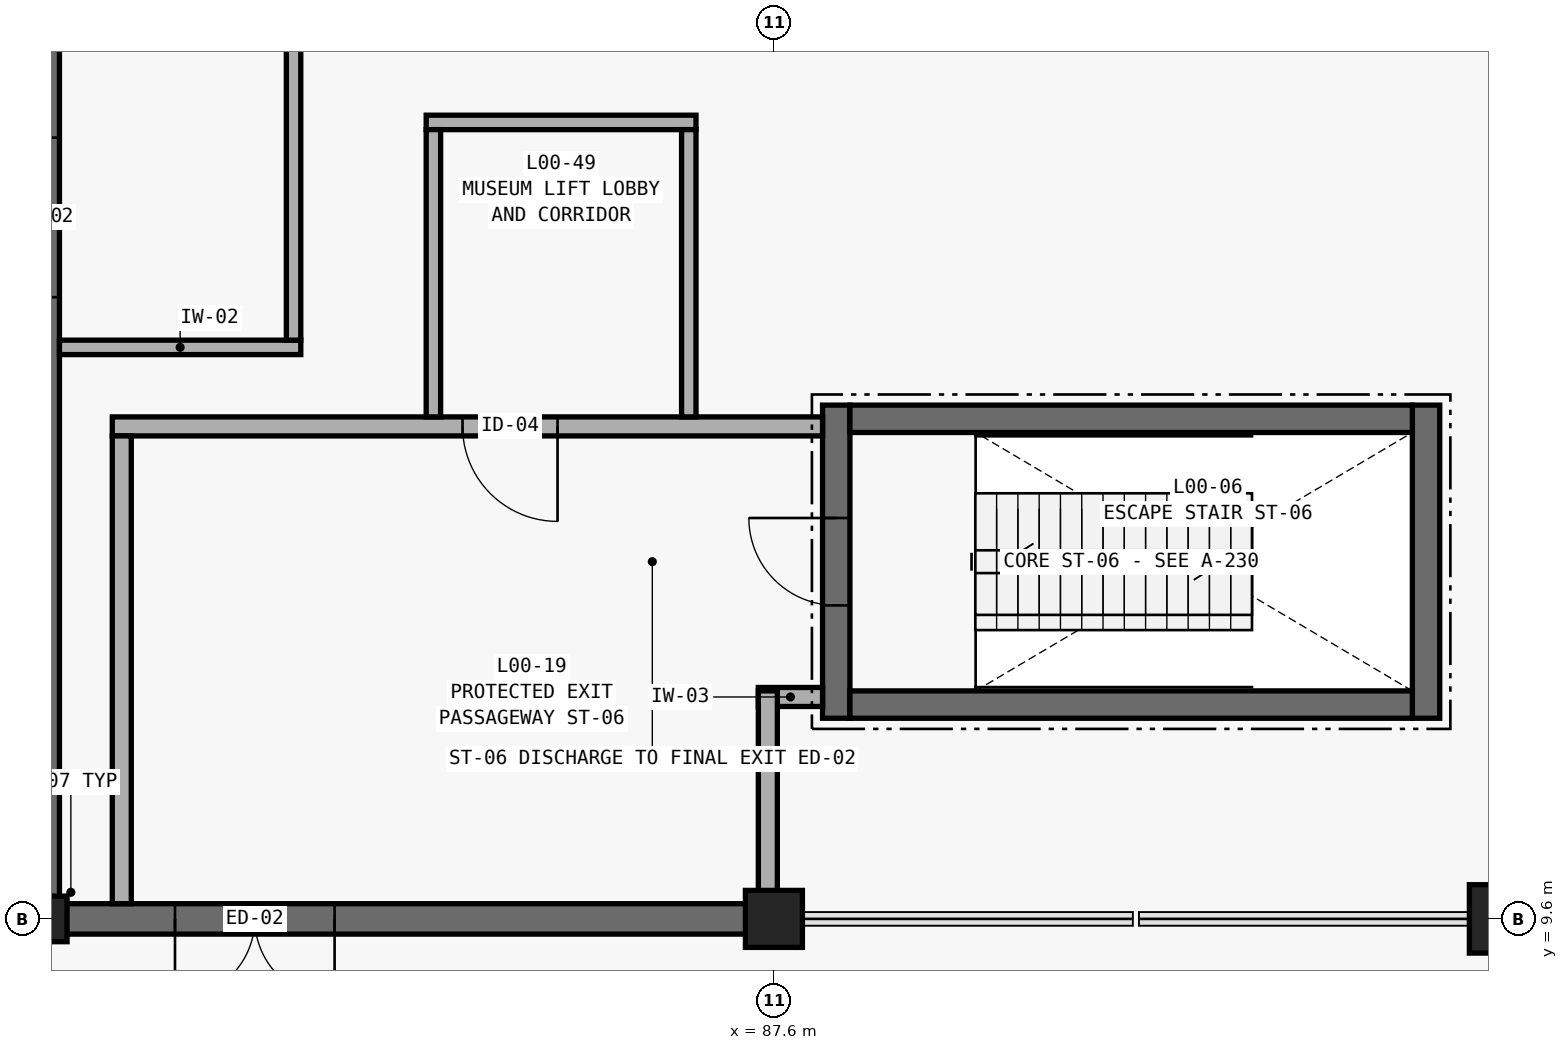
"""IFC4 building model, lengths in metres.
Left out: names, types, materials, properties, quantities, classifications, styles, units other than length and angle.
Written with IfcOpenShell. Run it as: python <this file> out.ifc"""

import sys

from ifc_helpers import new_model, si_unit, direction, frame, frame_2d, origin, origin_2d, place, context, subcontext, project, spatial, rectangle, extrude, element, fill, save


model = new_model("IFC4")
c1 = context("Model", 3, precision=1e-05, world=origin(), true_north=direction((0.0, 1.0)))
c2 = subcontext(c1, "Body", "Model", "MODEL_VIEW")
j1 = project(units=[si_unit("LENGTHUNIT", "METRE"), si_unit("PLANEANGLEUNIT", "RADIAN")], contexts=[c1])
p1 = place(None, origin())
s1 = spatial("IfcSite", under=j1, at=p1, CompositionType="ELEMENT")
p2 = place(p1, origin())
s2 = spatial("IfcBuilding", under=s1, at=p2, CompositionType="ELEMENT")
p3 = place(p2, origin())
s3 = spatial("IfcBuildingStorey", under=s2, at=p3, CompositionType="ELEMENT", Elevation=0.0)
p4 = place(p3, frame((78.0, 9.6, 0.0), z_axis=(0.0, 0.0, 1.0), x_axis=(1.0, 0.0, 0.0)))
e1 = element("IfcColumn", 1, at=p4, inside=s3, PredefinedType="COLUMN", context=c2, shape_type="SweptSolid", body=[
    extrude(rectangle(XDim=0.6, YDim=0.6, at=origin_2d()), origin(), (0.0, 0.0, 1.0), 4.8),
])
p5 = place(p3, frame((87.6, 9.6, 0.0), z_axis=(0.0, 0.0, 1.0), x_axis=(1.0, 0.0, 0.0)))
e2 = element("IfcColumn", 2, at=p5, inside=s3, PredefinedType="COLUMN", context=c2, shape_type="SweptSolid", body=[
    extrude(rectangle(XDim=0.75, YDim=0.75, at=origin_2d()), origin(), (0.0, 0.0, 1.0), 4.8),
])
p6 = place(p3, frame((97.2, 9.6, 0.0), z_axis=(0.0, 0.0, 1.0), x_axis=(1.0, 0.0, 0.0)))
e3 = element("IfcColumn", 3, at=p6, inside=s3, PredefinedType="COLUMN", context=c2, shape_type="SweptSolid", body=[
    extrude(rectangle(XDim=0.9, YDim=0.9, at=origin_2d()), origin(), (0.0, 0.0, 1.0), 4.8),
])
p7 = place(p3, frame((78.0, 21.78, 0.0), z_axis=(0.0, 0.0, 1.0), x_axis=(0.0, -1.0, 0.0)))
e4 = element("IfcWall", 4, at=p7, inside=s3, PredefinedType="STANDARD", context=c2, shape_type="SweptSolid", body=[
    extrude(rectangle(XDim=12.36, YDim=0.4, at=frame_2d((6.18, 0.0))), origin(), (0.0, 0.0, 1.0), 4.5),
])
p8 = place(p7, frame((1.9, 0.0, 0.0)))
e5 = element("IfcOpeningElement", 5, at=p8, cuts=e4, PredefinedType="OPENING", context=c2, shape_type="SweptSolid", body=[
    extrude(rectangle(XDim=2.1, YDim=2.6, at=frame_2d((1.05, 1.3))), frame((0.0, 0.215, 0.0), z_axis=(0.0, -1.0, 0.0), x_axis=(1.0, 0.0, 0.0)), (0.0, 0.0, 1.0), 0.43),
])
p9 = place(p3, frame((77.82, 9.6, 0.0), z_axis=(0.0, 0.0, 1.0), x_axis=(1.0, 0.0, 0.0)))
e6 = element("IfcWall", 6, at=p9, inside=s3, PredefinedType="STANDARD", context=c2, shape_type="SweptSolid", body=[
    extrude(rectangle(XDim=9.96, YDim=0.4, at=frame_2d((4.98, 0.0))), origin(), (0.0, 0.0, 1.0), 4.5),
])
p10 = place(p9, frame((1.9, 0.0, 0.0)))
e7 = element("IfcOpeningElement", 7, at=p10, cuts=e6, PredefinedType="OPENING", context=c2, shape_type="SweptSolid", body=[
    extrude(rectangle(XDim=2.1, YDim=2.6, at=frame_2d((1.05, 1.3))), frame((0.0, 0.215, 0.0), z_axis=(0.0, -1.0, 0.0), x_axis=(1.0, 0.0, 0.0)), (0.0, 0.0, 1.0), 0.43),
])
p11 = place(p3, frame((88.42, 12.24, 0.0), z_axis=(0.0, 0.0, 1.0), x_axis=(0.0, 1.0, 0.0)))
e8 = element("IfcWall", 8, at=p11, inside=s3, PredefinedType="SHEAR", context=c2, shape_type="SweptSolid", body=[
    extrude(rectangle(XDim=4.12, YDim=0.36, at=frame_2d((2.06, 0.0))), origin(), (0.0, 0.0, 1.0), 4.5),
])
p12 = place(p11, frame((1.485, 0.0, 0.0)))
e9 = element("IfcOpeningElement", 9, at=p12, cuts=e8, PredefinedType="OPENING", context=c2, shape_type="SweptSolid", body=[
    extrude(rectangle(XDim=1.15, YDim=2.15, at=frame_2d((0.575, 1.075))), frame((0.0, 0.195, 0.0), z_axis=(0.0, -1.0, 0.0), x_axis=(1.0, 0.0, 0.0)), (0.0, 0.0, 1.0), 0.39),
])
p13 = place(p3, frame((96.18, 12.24, 0.0), z_axis=(0.0, 0.0, 1.0), x_axis=(0.0, 1.0, 0.0)))
e10 = element("IfcWall", 10, at=p13, inside=s3, PredefinedType="SHEAR", context=c2, shape_type="SweptSolid", body=[
    extrude(rectangle(XDim=4.12, YDim=0.36, at=frame_2d((2.06, 0.0))), origin(), (0.0, 0.0, 1.0), 4.5),
])
for number, where, z_axis, x_axis in (
    (11, (88.6, 16.18, 0.0), (0.0, 0.0, 1.0), (1.0, 0.0, 0.0)),
    (12, (88.6, 12.42, 0.0), (0.0, 0.0, 1.0), (1.0, 0.0, 0.0)),
):
    element("IfcWall", number, at=place(p3, frame(where, z_axis=z_axis, x_axis=x_axis)), inside=s3, PredefinedType="SHEAR", context=c2, shape_type="SweptSolid", body=[
        extrude(rectangle(XDim=7.4, YDim=0.36, at=frame_2d((3.7, 0.0))), origin(), (0.0, 0.0, 1.0), 4.5),
    ])
p14 = place(p3, frame((87.395, 12.52, 0.0), z_axis=(0.0, 0.0, 1.0), x_axis=(1.0, 0.0, 0.0)))
e13 = element("IfcWall", 13, at=p14, inside=s3, PredefinedType="PARTITIONING", context=c2, shape_type="SweptSolid", body=[
    extrude(rectangle(XDim=0.845, YDim=0.25, at=frame_2d((0.422, 0.0))), origin(), (0.0, 0.0, 1.0), 3.38),
])
p15 = place(p3, frame((78.895, 16.08, 0.0), z_axis=(0.0, 0.0, 1.0), x_axis=(1.0, 0.0, 0.0)))
e14 = element("IfcWall", 14, at=p15, inside=s3, PredefinedType="PARTITIONING", context=c2, shape_type="SweptSolid", body=[
    extrude(rectangle(XDim=9.345, YDim=0.25, at=frame_2d((4.672, 0.0))), origin(), (0.0, 0.0, 1.0), 3.38),
])
p16 = place(p15, frame((4.608, 0.0, 0.0)))
e15 = element("IfcOpeningElement", 15, at=p16, cuts=e14, PredefinedType="OPENING", context=c2, shape_type="SweptSolid", body=[
    extrude(rectangle(XDim=1.25, YDim=2.15, at=frame_2d((0.625, 1.075))), frame((0.0, 0.14, 0.0), z_axis=(0.0, -1.0, 0.0), x_axis=(1.0, 0.0, 0.0)), (0.0, 0.0, 1.0), 0.28),
])
p17 = place(p3, frame((78.2, 17.12, 0.0), z_axis=(0.0, 0.0, 1.0), x_axis=(1.0, 0.0, 0.0)))
e16 = element("IfcWall", 16, at=p17, inside=s3, PredefinedType="PARTITIONING", context=c2, shape_type="SweptSolid", body=[
    extrude(rectangle(XDim=3.175, YDim=0.19, at=frame_2d((1.587, 0.0))), origin(), (0.0, 0.0, 1.0), 3.38),
])
p18 = place(p3, frame((83.025, 20.08, 0.0), z_axis=(0.0, 0.0, 1.0), x_axis=(1.0, 0.0, 0.0)))
e17 = element("IfcWall", 17, at=p18, inside=s3, PredefinedType="PARTITIONING", context=c2, shape_type="SweptSolid", body=[
    extrude(rectangle(XDim=3.55, YDim=0.19, at=frame_2d((1.775, 0.0))), origin(), (0.0, 0.0, 1.0), 3.38),
])
p19 = place(p3, frame((79.02, 9.8, 0.0), z_axis=(0.0, 0.0, 1.0), x_axis=(0.0, 1.0, 0.0)))
e18 = element("IfcWall", 18, at=p19, inside=s3, PredefinedType="PARTITIONING", context=c2, shape_type="SweptSolid", body=[
    extrude(rectangle(XDim=6.155, YDim=0.25, at=frame_2d((3.078, 0.0))), origin(), (0.0, 0.0, 1.0), 3.38),
])
p20 = place(p3, frame((81.28, 17.215, 0.0), z_axis=(0.0, 0.0, 1.0), x_axis=(0.0, 1.0, 0.0)))
e19 = element("IfcWall", 19, at=p20, inside=s3, PredefinedType="PARTITIONING", context=c2, shape_type="SweptSolid", body=[
    extrude(rectangle(XDim=15.37, YDim=0.19, at=frame_2d((7.685, 0.0))), origin(), (0.0, 0.0, 1.0), 3.38),
])
for number, where, z_axis, x_axis in (
    (20, (83.12, 16.205, 0.0), (0.0, 0.0, 1.0), (0.0, 1.0, 0.0)),
    (21, (86.48, 16.205, 0.0), (0.0, 0.0, 1.0), (0.0, 1.0, 0.0)),
):
    element("IfcWall", number, at=place(p3, frame(where, z_axis=z_axis, x_axis=x_axis)), inside=s3, PredefinedType="PARTITIONING", context=c2, shape_type="SweptSolid", body=[
        extrude(rectangle(XDim=3.78, YDim=0.19, at=frame_2d((1.89, 0.0))), origin(), (0.0, 0.0, 1.0), 3.38),
    ])
p21 = place(p3, frame((87.52, 9.8, 0.0), z_axis=(0.0, 0.0, 1.0), x_axis=(0.0, 1.0, 0.0)))
e22 = element("IfcWall", 22, at=p21, inside=s3, PredefinedType="PARTITIONING", context=c2, shape_type="SweptSolid", body=[
    extrude(rectangle(XDim=2.8, YDim=0.25, at=frame_2d((1.4, 0.0))), origin(), (0.0, 0.0, 1.0), 3.38),
])
p22 = place(p10, frame((2.1, 0.0, 0.0), z_axis=(0.0, 0.0, 1.0), x_axis=(-1.0, 0.0, 0.0)))
e23 = element("IfcDoor", 23, at=p22, inside=s3, OperationType="DOUBLE_DOOR_SINGLE_SWING", PredefinedType="DOOR", context=c2, shape_type="SweptSolid", body=[
    extrude(rectangle(XDim=2.1, YDim=2.6, at=frame_2d((1.05, 1.3))), frame((0.0, 0.025, 0.0), z_axis=(0.0, -1.0, 0.0), x_axis=(1.0, 0.0, 0.0)), (0.0, 0.0, 1.0), 0.05),
])
fill(e7, e23)
p23 = place(p12, origin())
e24 = element("IfcDoor", 24, at=p23, inside=s3, OperationType="SINGLE_SWING_RIGHT", PredefinedType="DOOR", context=c2, shape_type="SweptSolid", body=[
    extrude(rectangle(XDim=1.15, YDim=2.15, at=frame_2d((0.575, 1.075))), frame((0.0, 0.025, 0.0), z_axis=(0.0, -1.0, 0.0), x_axis=(1.0, 0.0, 0.0)), (0.0, 0.0, 1.0), 0.05),
])
fill(e9, e24)
p24 = place(p16, frame((1.25, 0.0, 0.0), z_axis=(0.0, 0.0, 1.0), x_axis=(-1.0, 0.0, 0.0)))
e25 = element("IfcDoor", 25, at=p24, inside=s3, OperationType="SINGLE_SWING_RIGHT", PredefinedType="DOOR", context=c2, shape_type="SweptSolid", body=[
    extrude(rectangle(XDim=1.25, YDim=2.15, at=frame_2d((0.625, 1.075))), frame((0.0, 0.025, 0.0), z_axis=(0.0, -1.0, 0.0), x_axis=(1.0, 0.0, 0.0)), (0.0, 0.0, 1.0), 0.05),
])
fill(e15, e25)
save(model, sys.argv[1])
